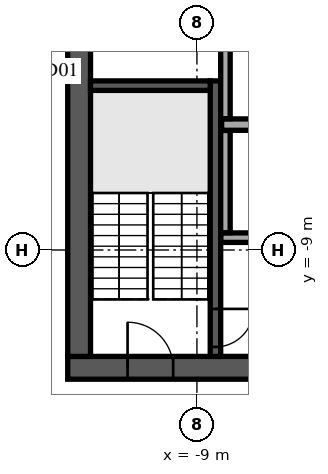
"""IFC4 building model, lengths in metres.
Left out: names, types, materials, properties, quantities, classifications, styles, units other than length and angle.
Written with IfcOpenShell. Run it as: python <this file> out.ifc"""

import sys

from ifc_helpers import new_model, si_unit, direction, frame, frame_2d, origin, place, context, subcontext, project, spatial, rectangle, extrude, element, fill, save


model = new_model("IFC4")
c1 = context("Model", 3, precision=1e-05, world=origin(), true_north=direction((0.0, 1.0)))
c2 = subcontext(c1, "Body", "Model", "MODEL_VIEW")
j1 = project(units=[si_unit("LENGTHUNIT", "METRE"), si_unit("PLANEANGLEUNIT", "RADIAN")], contexts=[c1])
p1 = place(None, origin())
s1 = spatial("IfcSite", under=j1, at=p1, CompositionType="ELEMENT")
p2 = place(p1, origin())
s2 = spatial("IfcBuilding", under=s1, at=p2, CompositionType="ELEMENT")
p3 = place(p2, frame((0.0, 0.0, 300.5)))
s3 = spatial("IfcBuildingStorey", under=s2, at=p3, CompositionType="ELEMENT", Elevation=300.5)
p4 = place(p3, frame((-12.4, -12.1, 0.0), z_axis=(0.0, 0.0, 1.0), x_axis=(1.0, 0.0, 0.0)))
e1 = element("IfcWall", 1, at=p4, inside=s3, PredefinedType="SHEAR", context=c2, shape_type="SweptSolid", body=[
    extrude(rectangle(XDim=24.8, YDim=0.6, at=frame_2d((12.4, 0.0))), origin(), (0.0, 0.0, 1.0), 3.65),
])
p5 = place(p4, frame((7.3, 0.0, 0.0)))
e2 = element("IfcOpeningElement", 2, at=p5, cuts=e1, PredefinedType="OPENING", context=c2, shape_type="SweptSolid", body=[
    extrude(rectangle(XDim=2.0, YDim=2.1, at=frame_2d((1.0, 1.05))), frame((0.0, 0.31, 0.0), z_axis=(0.0, -1.0, 0.0), x_axis=(1.0, 0.0, 0.0)), (0.0, 0.0, 1.0), 0.62),
])
p6 = place(p4, frame((17.425, 0.0, 0.0)))
e3 = element("IfcOpeningElement", 3, at=p6, cuts=e1, PredefinedType="OPENING", context=c2, shape_type="SweptSolid", body=[
    extrude(rectangle(XDim=1.2, YDim=2.1, at=frame_2d((0.6, 1.05))), frame((0.0, 0.31, 0.0), z_axis=(0.0, -1.0, 0.0), x_axis=(1.0, 0.0, 0.0)), (0.0, 0.0, 1.0), 0.62),
])
p7 = place(p4, frame((1.575, 0.0, 0.0)))
e4 = element("IfcOpeningElement", 4, at=p7, cuts=e1, PredefinedType="OPENING", context=c2, shape_type="SweptSolid", body=[
    extrude(rectangle(XDim=1.2, YDim=2.1, at=frame_2d((0.6, 1.05))), frame((0.0, 0.31, 0.0), z_axis=(0.0, -1.0, 0.0), x_axis=(1.0, 0.0, 0.0)), (0.0, 0.0, 1.0), 0.62),
])
p8 = place(p4, frame((22.025, 0.0, 0.0)))
e5 = element("IfcOpeningElement", 5, at=p8, cuts=e1, PredefinedType="OPENING", context=c2, shape_type="SweptSolid", body=[
    extrude(rectangle(XDim=1.2, YDim=2.1, at=frame_2d((0.6, 1.05))), frame((0.0, 0.31, 0.0), z_axis=(0.0, -1.0, 0.0), x_axis=(1.0, 0.0, 0.0)), (0.0, 0.0, 1.0), 0.62),
])
p9 = place(p3, frame((-12.1, -11.8, 0.0), z_axis=(0.0, 0.0, 1.0), x_axis=(0.0, 1.0, 0.0)))
e6 = element("IfcWall", 6, at=p9, inside=s3, PredefinedType="SHEAR", context=c2, shape_type="SweptSolid", body=[
    extrude(rectangle(XDim=23.6, YDim=0.6, at=frame_2d((11.8, 0.0))), origin(), (0.0, 0.0, 1.0), 3.65),
])
p10 = place(p9, frame((10.6, 0.0, 0.0)))
e7 = element("IfcOpeningElement", 7, at=p10, cuts=e6, PredefinedType="OPENING", context=c2, shape_type="SweptSolid", body=[
    extrude(rectangle(XDim=2.4, YDim=2.4, at=frame_2d((1.2, 1.2))), frame((0.0, 0.31, 0.0), z_axis=(0.0, -1.0, 0.0), x_axis=(1.0, 0.0, 0.0)), (0.0, 0.0, 1.0), 0.62),
])
p11 = place(p3, frame((-8.512, -4.55, 0.0), z_axis=(0.0, 0.0, 1.0), x_axis=(0.0, -1.0, 0.0)))
e8 = element("IfcWall", 8, at=p11, inside=s3, PredefinedType="SOLIDWALL", context=c2, shape_type="SweptSolid", body=[
    extrude(rectangle(XDim=7.25, YDim=0.275, at=frame_2d((3.625, 0.0))), origin(), (0.0, 0.0, 1.0), 3.65),
])
p12 = place(p11, frame((6.0, 0.0, 0.0)))
e9 = element("IfcOpeningElement", 9, at=p12, cuts=e8, PredefinedType="OPENING", context=c2, shape_type="SweptSolid", body=[
    extrude(rectangle(XDim=1.0, YDim=2.1, at=frame_2d((0.5, 1.05))), frame((0.0, 0.147, 0.0), z_axis=(0.0, -1.0, 0.0), x_axis=(1.0, 0.0, 0.0)), (0.0, 0.0, 1.0), 0.295),
])
p13 = place(p3, frame((-8.65, -4.675, 0.0), z_axis=(0.0, 0.0, 1.0), x_axis=(-1.0, 0.0, 0.0)))
e10 = element("IfcWall", 10, at=p13, inside=s3, PredefinedType="SOLIDWALL", context=c2, shape_type="SweptSolid", body=[
    extrude(rectangle(XDim=3.15, YDim=0.25, at=frame_2d((1.575, 0.0))), origin(), (0.0, 0.0, 1.0), 3.65),
])
p14 = place(p3, frame((-8.37, -8.675, 0.0), z_axis=(0.0, 0.0, 1.0), x_axis=(1.0, 0.0, 0.0)))
e11 = element("IfcWall", 11, at=p14, inside=s3, PredefinedType="PARTITIONING", context=c2, shape_type="SweptSolid", body=[
    extrude(rectangle(XDim=5.49, YDim=0.25, at=frame_2d((2.745, 0.0))), origin(), (0.0, 0.0, 1.0), 3.65),
])
p15 = place(p14, frame((0.995, 0.0, 0.0)))
e12 = element("IfcOpeningElement", 12, at=p15, cuts=e11, PredefinedType="OPENING", context=c2, shape_type="SweptSolid", body=[
    extrude(rectangle(XDim=1.0, YDim=2.1, at=frame_2d((0.5, 1.05))), frame((0.0, 0.135, 0.0), z_axis=(0.0, -1.0, 0.0), x_axis=(1.0, 0.0, 0.0)), (0.0, 0.0, 1.0), 0.27),
])
p16 = place(p14, frame((3.745, 0.0, 0.0)))
e13 = element("IfcOpeningElement", 13, at=p16, cuts=e11, PredefinedType="OPENING", context=c2, shape_type="SweptSolid", body=[
    extrude(rectangle(XDim=1.0, YDim=2.1, at=frame_2d((0.5, 1.05))), frame((0.0, 0.135, 0.0), z_axis=(0.0, -1.0, 0.0), x_axis=(1.0, 0.0, 0.0)), (0.0, 0.0, 1.0), 0.27),
])
p17 = place(p3, frame((-8.25, -8.545, 0.0), z_axis=(0.0, 0.0, 1.0), x_axis=(0.0, 1.0, 0.0)))
e14 = element("IfcWall", 14, at=p17, inside=s3, PredefinedType="PARTITIONING", context=c2, shape_type="SweptSolid", body=[
    extrude(rectangle(XDim=2.69, YDim=0.25, at=frame_2d((1.345, 0.0))), origin(), (0.0, 0.0, 1.0), 3.65),
])
p18 = place(p3, frame((-8.35, -5.7, 0.0), z_axis=(0.0, 0.0, 1.0), x_axis=(1.0, 0.0, 0.0)))
e15 = element("IfcWall", 15, at=p18, inside=s3, PredefinedType="PARTITIONING", context=c2, shape_type="SweptSolid", body=[
    extrude(rectangle(XDim=5.47, YDim=0.3, at=frame_2d((2.735, 0.0))), origin(), (0.0, 0.0, 1.0), 3.65),
])
p19 = place(p3, frame((-8.25, -5.545, 0.0), z_axis=(0.0, 0.0, 1.0), x_axis=(0.0, 1.0, 0.0)))
e16 = element("IfcWall", 16, at=p19, inside=s3, PredefinedType="PARTITIONING", context=c2, shape_type="SweptSolid", body=[
    extrude(rectangle(XDim=2.69, YDim=0.25, at=frame_2d((1.345, 0.0))), origin(), (0.0, 0.0, 1.0), 3.65),
])
p20 = place(p3, frame((-23.896, -11.711, 0.0), z_axis=(0.0, 0.0, 1.0), x_axis=(0.920507643781, -0.390724554821, 0.0)))
e17 = element("IfcWall", 17, at=p20, inside=s3, PredefinedType="PARTITIONING", context=c2, shape_type="SweptSolid", body=[
    extrude(rectangle(XDim=34.917, YDim=0.15, at=frame_2d((17.458, 0.0))), origin(), (0.0, 0.0, 1.0), 3.25),
])
p21 = place(p20, frame((7.05, 0.0, 0.0)))
e18 = element("IfcOpeningElement", 18, at=p21, cuts=e17, PredefinedType="OPENING", context=c2, shape_type="SweptSolid", body=[
    extrude(rectangle(XDim=1.8, YDim=2.1, at=frame_2d((0.9, 1.05))), frame((0.0, 0.085, 0.0), z_axis=(0.0, -1.0, 0.0), x_axis=(1.0, 0.0, 0.0)), (0.0, 0.0, 1.0), 0.17),
])
p22 = place(p20, frame((14.27, 0.0, 0.0)))
e19 = element("IfcOpeningElement", 19, at=p22, cuts=e17, PredefinedType="OPENING", context=c2, shape_type="SweptSolid", body=[
    extrude(rectangle(XDim=1.0, YDim=2.1, at=frame_2d((0.5, 1.05))), frame((0.0, 0.085, 0.0), z_axis=(0.0, -1.0, 0.0), x_axis=(1.0, 0.0, 0.0)), (0.0, 0.0, 1.0), 0.17),
])
p23 = place(p20, frame((29.011, 0.0, 0.0)))
e20 = element("IfcOpeningElement", 20, at=p23, cuts=e17, PredefinedType="OPENING", context=c2, shape_type="SweptSolid", body=[
    extrude(rectangle(XDim=1.0, YDim=2.1, at=frame_2d((0.5, 1.05))), frame((0.0, 0.085, 0.0), z_axis=(0.0, -1.0, 0.0), x_axis=(1.0, 0.0, 0.0)), (0.0, 0.0, 1.0), 0.17),
])
p24 = place(p7, origin())
e21 = element("IfcDoor", 21, at=p24, inside=s3, OperationType="SINGLE_SWING_LEFT", PredefinedType="DOOR", context=c2, shape_type="SweptSolid", body=[
    extrude(rectangle(XDim=1.2, YDim=2.1, at=frame_2d((0.6, 1.05))), frame((0.0, 0.025, 0.0), z_axis=(0.0, -1.0, 0.0), x_axis=(1.0, 0.0, 0.0)), (0.0, 0.0, 1.0), 0.05),
])
fill(e4, e21)
p25 = place(p12, origin())
e22 = element("IfcDoor", 22, at=p25, inside=s3, OperationType="SINGLE_SWING_LEFT", PredefinedType="DOOR", context=c2, shape_type="SweptSolid", body=[
    extrude(rectangle(XDim=1.0, YDim=2.1, at=frame_2d((0.5, 1.05))), frame((0.0, 0.025, 0.0), z_axis=(0.0, -1.0, 0.0), x_axis=(1.0, 0.0, 0.0)), (0.0, 0.0, 1.0), 0.05),
])
fill(e9, e22)
save(model, sys.argv[1])
